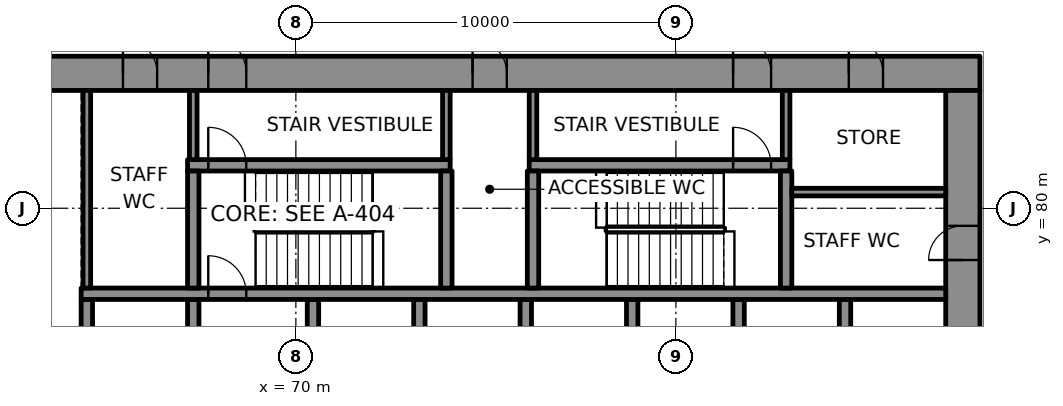
"""IFC4 building model, lengths in metres.
Left out: names, types, materials, properties, quantities, classifications, styles, units other than length and angle.
Written with IfcOpenShell. Run it as: python <this file> out.ifc"""

import sys

from ifc_helpers import new_model, si_unit, direction, frame, frame_2d, origin, place, context, subcontext, project, spatial, rectangle, extrude, element, fill, save


model = new_model("IFC4")
c1 = context("Model", 3, precision=1e-05, world=origin(), true_north=direction((0.0, 1.0)))
c2 = subcontext(c1, "Body", "Model", "MODEL_VIEW")
j1 = project(units=[si_unit("LENGTHUNIT", "METRE"), si_unit("PLANEANGLEUNIT", "RADIAN")], contexts=[c1])
p1 = place(None, origin())
s1 = spatial("IfcSite", under=j1, at=p1, CompositionType="ELEMENT")
p2 = place(p1, origin())
s2 = spatial("IfcBuilding", under=s1, at=p2, CompositionType="ELEMENT")
p3 = place(p2, frame((0.0, 0.0, 52.6)))
s3 = spatial("IfcBuildingStorey", under=s2, at=p3, CompositionType="ELEMENT", Elevation=52.6)
p4 = place(p3, frame((62.9, 83.55, 0.0), z_axis=(0.0, 0.0, 1.0), x_axis=(1.0, 0.0, 0.0)))
e1 = element("IfcWall", 1, at=p4, inside=s3, PredefinedType="SHEAR", context=c2, shape_type="SweptSolid", body=[
    extrude(rectangle(XDim=25.1, YDim=0.9, at=frame_2d((12.55, 0.0))), origin(), (0.0, 0.0, 1.0), 4.0),
])
p5 = place(p4, frame((4.795, 0.0, 0.0)))
e2 = element("IfcOpeningElement", 2, at=p5, cuts=e1, PredefinedType="OPENING", context=c2, shape_type="SweptSolid", body=[
    extrude(rectangle(XDim=1.0, YDim=2.1, at=frame_2d((0.5, 1.05))), frame((0.0, 0.46, 0.0), z_axis=(0.0, -1.0, 0.0), x_axis=(1.0, 0.0, 0.0)), (0.0, 0.0, 1.0), 0.92),
])
p6 = place(p4, frame((18.605, 0.0, 0.0)))
e3 = element("IfcOpeningElement", 3, at=p6, cuts=e1, PredefinedType="OPENING", context=c2, shape_type="SweptSolid", body=[
    extrude(rectangle(XDim=1.0, YDim=2.1, at=frame_2d((0.5, 1.05))), frame((0.0, 0.46, 0.0), z_axis=(0.0, -1.0, 0.0), x_axis=(1.0, 0.0, 0.0)), (0.0, 0.0, 1.0), 0.92),
])
p7 = place(p4, frame((2.55, 0.0, 0.0)))
e4 = element("IfcOpeningElement", 4, at=p7, cuts=e1, PredefinedType="OPENING", context=c2, shape_type="SweptSolid", body=[
    extrude(rectangle(XDim=0.9, YDim=2.1, at=frame_2d((0.45, 1.05))), frame((0.0, 0.46, 0.0), z_axis=(0.0, -1.0, 0.0), x_axis=(1.0, 0.0, 0.0)), (0.0, 0.0, 1.0), 0.92),
])
p8 = place(p4, frame((11.75, 0.0, 0.0)))
e5 = element("IfcOpeningElement", 5, at=p8, cuts=e1, PredefinedType="OPENING", context=c2, shape_type="SweptSolid", body=[
    extrude(rectangle(XDim=0.9, YDim=2.1, at=frame_2d((0.45, 1.05))), frame((0.0, 0.46, 0.0), z_axis=(0.0, -1.0, 0.0), x_axis=(1.0, 0.0, 0.0)), (0.0, 0.0, 1.0), 0.92),
])
p9 = place(p4, frame((21.65, 0.0, 0.0)))
e6 = element("IfcOpeningElement", 6, at=p9, cuts=e1, PredefinedType="OPENING", context=c2, shape_type="SweptSolid", body=[
    extrude(rectangle(XDim=0.9, YDim=2.1, at=frame_2d((0.45, 1.05))), frame((0.0, 0.46, 0.0), z_axis=(0.0, -1.0, 0.0), x_axis=(1.0, 0.0, 0.0)), (0.0, 0.0, 1.0), 0.92),
])
p10 = place(p3, frame((87.55, 66.9, 0.0), z_axis=(0.0, 0.0, 1.0), x_axis=(0.0, 1.0, 0.0)))
e7 = element("IfcWall", 7, at=p10, inside=s3, PredefinedType="SHEAR", context=c2, shape_type="SweptSolid", body=[
    extrude(rectangle(XDim=16.2, YDim=0.9, at=frame_2d((8.1, 0.0))), origin(), (0.0, 0.0, 1.0), 4.0),
])
p11 = place(p10, frame((5.5, 0.0, 0.0)))
e8 = element("IfcOpeningElement", 8, at=p11, cuts=e7, PredefinedType="OPENING", context=c2, shape_type="SweptSolid", body=[
    extrude(rectangle(XDim=1.8, YDim=2.1, at=frame_2d((0.9, 1.05))), frame((0.0, 0.46, 0.0), z_axis=(0.0, -1.0, 0.0), x_axis=(1.0, 0.0, 0.0)), (0.0, 0.0, 1.0), 0.92),
])
p12 = place(p10, frame((11.738, 0.0, 0.0)))
e9 = element("IfcOpeningElement", 9, at=p12, cuts=e7, PredefinedType="OPENING", context=c2, shape_type="SweptSolid", body=[
    extrude(rectangle(XDim=0.9, YDim=2.1, at=frame_2d((0.45, 1.05))), frame((0.0, 0.46, 0.0), z_axis=(0.0, -1.0, 0.0), x_axis=(1.0, 0.0, 0.0)), (0.0, 0.0, 1.0), 0.92),
])
for number, where, z_axis, x_axis in (
    (10, (64.5, 75.0, 0.0), (0.0, 0.0, 1.0), (0.0, 1.0, 0.0)),
    (11, (67.3, 75.0, 0.0), (0.0, 0.0, 1.0), (0.0, 1.0, 0.0)),
):
    element("IfcWall", number, at=place(p3, frame(where, z_axis=z_axis, x_axis=x_axis)), inside=s3, PredefinedType="SHEAR", context=c2, shape_type="SweptSolid", body=[
        extrude(rectangle(XDim=2.6, YDim=0.3, at=frame_2d((1.3, 0.0))), origin(), (0.0, 0.0, 1.0), 4.0),
    ])
p13 = place(p3, frame((70.45, 75.0, 0.0), z_axis=(0.0, 0.0, 1.0), x_axis=(0.0, 1.0, 0.0)))
e12 = element("IfcWall", 12, at=p13, inside=s3, PredefinedType="SHEAR", context=c2, shape_type="SweptSolid", body=[
    extrude(rectangle(XDim=2.6, YDim=0.3, at=frame_2d((1.3, 0.0))), origin(), (0.0, 0.0, 1.0), 4.0),
])
p14 = place(p13, frame((0.15, 0.0, 0.0)))
e13 = element("IfcOpeningElement", 13, at=p14, cuts=e12, PredefinedType="OPENING", context=c2, shape_type="SweptSolid", body=[
    extrude(rectangle(XDim=1.1, YDim=2.1, at=frame_2d((0.55, 1.05))), frame((0.0, 0.16, 0.0), z_axis=(0.0, -1.0, 0.0), x_axis=(1.0, 0.0, 0.0)), (0.0, 0.0, 1.0), 0.32),
])
for number, where, z_axis, x_axis in (
    (14, (73.25, 75.0, 0.0), (0.0, 0.0, 1.0), (0.0, 1.0, 0.0)),
    (15, (76.05, 75.0, 0.0), (0.0, 0.0, 1.0), (0.0, 1.0, 0.0)),
    (16, (78.85, 75.0, 0.0), (0.0, 0.0, 1.0), (0.0, 1.0, 0.0)),
    (17, (81.65, 75.0, 0.0), (0.0, 0.0, 1.0), (0.0, 1.0, 0.0)),
    (18, (84.45, 75.0, 0.0), (0.0, 0.0, 1.0), (0.0, 1.0, 0.0)),
):
    element("IfcWall", number, at=place(p3, frame(where, z_axis=z_axis, x_axis=x_axis)), inside=s3, PredefinedType="SHEAR", context=c2, shape_type="SweptSolid", body=[
        extrude(rectangle(XDim=2.6, YDim=0.3, at=frame_2d((1.3, 0.0))), origin(), (0.0, 0.0, 1.0), 4.0),
    ])
p15 = place(p3, frame((64.35, 77.75, 0.0), z_axis=(0.0, 0.0, 1.0), x_axis=(1.0, 0.0, 0.0)))
e19 = element("IfcWall", 19, at=p15, inside=s3, PredefinedType="SHEAR", context=c2, shape_type="SweptSolid", body=[
    extrude(rectangle(XDim=22.75, YDim=0.3, at=frame_2d((11.375, 0.0))), origin(), (0.0, 0.0, 1.0), 4.0),
])
p16 = place(p15, frame((3.345, 0.0, 0.0)))
e20 = element("IfcOpeningElement", 20, at=p16, cuts=e19, PredefinedType="OPENING", context=c2, shape_type="SweptSolid", body=[
    extrude(rectangle(XDim=1.0, YDim=2.1, at=frame_2d((0.5, 1.05))), frame((0.0, 0.16, 0.0), z_axis=(0.0, -1.0, 0.0), x_axis=(1.0, 0.0, 0.0)), (0.0, 0.0, 1.0), 0.32),
])
p17 = place(p3, frame((67.15, 81.13, 0.0), z_axis=(0.0, 0.0, 1.0), x_axis=(1.0, 0.0, 0.0)))
e21 = element("IfcWall", 21, at=p17, inside=s3, PredefinedType="SHEAR", context=c2, shape_type="SweptSolid", body=[
    extrude(rectangle(XDim=6.91, YDim=0.3, at=frame_2d((3.455, 0.0))), origin(), (0.0, 0.0, 1.0), 4.0),
])
p18 = place(p17, frame((0.545, 0.0, 0.0)))
e22 = element("IfcOpeningElement", 22, at=p18, cuts=e21, PredefinedType="OPENING", context=c2, shape_type="SweptSolid", body=[
    extrude(rectangle(XDim=1.0, YDim=2.1, at=frame_2d((0.5, 1.05))), frame((0.0, 0.16, 0.0), z_axis=(0.0, -1.0, 0.0), x_axis=(1.0, 0.0, 0.0)), (0.0, 0.0, 1.0), 0.32),
])
p19 = place(p3, frame((76.14, 81.13, 0.0), z_axis=(0.0, 0.0, 1.0), x_axis=(1.0, 0.0, 0.0)))
e23 = element("IfcWall", 23, at=p19, inside=s3, PredefinedType="SHEAR", context=c2, shape_type="SweptSolid", body=[
    extrude(rectangle(XDim=6.86, YDim=0.3, at=frame_2d((3.43, 0.0))), origin(), (0.0, 0.0, 1.0), 4.0),
])
p20 = place(p19, frame((5.365, 0.0, 0.0)))
e24 = element("IfcOpeningElement", 24, at=p20, cuts=e23, PredefinedType="OPENING", context=c2, shape_type="SweptSolid", body=[
    extrude(rectangle(XDim=1.0, YDim=2.1, at=frame_2d((0.5, 1.05))), frame((0.0, 0.16, 0.0), z_axis=(0.0, -1.0, 0.0), x_axis=(1.0, 0.0, 0.0)), (0.0, 0.0, 1.0), 0.32),
])
for number, where, z_axis, x_axis in (
    (25, (67.3, 77.9, 0.0), (0.0, 0.0, 1.0), (0.0, 1.0, 0.0)),
    (26, (73.96, 77.9, 0.0), (0.0, 0.0, 1.0), (0.0, 1.0, 0.0)),
    (27, (76.24, 77.9, 0.0), (0.0, 0.0, 1.0), (0.0, 1.0, 0.0)),
    (28, (82.9, 77.9, 0.0), (0.0, 0.0, 1.0), (0.0, 1.0, 0.0)),
):
    element("IfcWall", number, at=place(p3, frame(where, z_axis=z_axis, x_axis=x_axis)), inside=s3, PredefinedType="SHEAR", context=c2, shape_type="SweptSolid", body=[
        extrude(rectangle(XDim=3.08, YDim=0.3, at=frame_2d((1.54, 0.0))), origin(), (0.0, 0.0, 1.0), 4.0),
    ])
p21 = place(p3, frame((110.994, 61.012, 0.0), z_axis=(0.0, 0.0, 1.0), x_axis=(-0.500000853759, 0.866024910866, 0.0)))
e29 = element("IfcWall", 29, at=p21, inside=s3, PredefinedType="SOLIDWALL", context=c2, shape_type="SweptSolid", body=[
    extrude(rectangle(XDim=60.222, YDim=0.8, at=frame_2d((30.111, 0.0))), origin(), (0.0, 0.0, 1.0), 0.9),
])
p22 = place(p3, frame((83.05, 80.425, 0.0), z_axis=(0.0, 0.0, 1.0), x_axis=(1.0, 0.0, 0.0)))
e30 = element("IfcWall", 30, at=p22, inside=s3, PredefinedType="PARTITIONING", context=c2, shape_type="SweptSolid", body=[
    extrude(rectangle(XDim=4.05, YDim=0.2, at=frame_2d((2.025, 0.0))), origin(), (0.0, 0.0, 1.0), 4.0),
])
p23 = place(p3, frame((64.5, 77.9, 0.0), z_axis=(0.0, 0.0, 1.0), x_axis=(0.0, 1.0, 0.0)))
e31 = element("IfcWall", 31, at=p23, inside=s3, PredefinedType="PARTITIONING", context=c2, shape_type="SweptSolid", body=[
    extrude(rectangle(XDim=5.2, YDim=0.2, at=frame_2d((2.6, 0.0))), origin(), (0.0, 0.0, 1.0), 4.0),
])
for number, where, z_axis, x_axis in (
    (32, (67.3, 81.28, 0.0), (0.0, 0.0, 1.0), (0.0, 1.0, 0.0)),
    (33, (73.96, 81.28, 0.0), (0.0, 0.0, 1.0), (0.0, 1.0, 0.0)),
    (34, (76.24, 81.28, 0.0), (0.0, 0.0, 1.0), (0.0, 1.0, 0.0)),
    (35, (82.9, 81.28, 0.0), (0.0, 0.0, 1.0), (0.0, 1.0, 0.0)),
):
    element("IfcWall", number, at=place(p3, frame(where, z_axis=z_axis, x_axis=x_axis)), inside=s3, PredefinedType="PARTITIONING", context=c2, shape_type="SweptSolid", body=[
        extrude(rectangle(XDim=1.82, YDim=0.2, at=frame_2d((0.91, 0.0))), origin(), (0.0, 0.0, 1.0), 4.0),
    ])
p24 = place(p16, origin())
e36 = element("IfcDoor", 36, at=p24, inside=s3, OperationType="SINGLE_SWING_LEFT", PredefinedType="DOOR", context=c2, shape_type="SweptSolid", body=[
    extrude(rectangle(XDim=1.0, YDim=2.1, at=frame_2d((0.5, 1.05))), frame((0.0, 0.025, 0.0), z_axis=(0.0, -1.0, 0.0), x_axis=(1.0, 0.0, 0.0)), (0.0, 0.0, 1.0), 0.05),
])
fill(e20, e36)
p25 = place(p18, origin())
e37 = element("IfcDoor", 37, at=p25, inside=s3, OperationType="SINGLE_SWING_RIGHT", PredefinedType="DOOR", context=c2, shape_type="SweptSolid", body=[
    extrude(rectangle(XDim=1.0, YDim=2.1, at=frame_2d((0.5, 1.05))), frame((0.0, 0.025, 0.0), z_axis=(0.0, -1.0, 0.0), x_axis=(1.0, 0.0, 0.0)), (0.0, 0.0, 1.0), 0.05),
])
fill(e22, e37)
p26 = place(p5, origin())
e38 = element("IfcDoor", 38, at=p26, inside=s3, OperationType="SINGLE_SWING_LEFT", PredefinedType="DOOR", context=c2, shape_type="SweptSolid", body=[
    extrude(rectangle(XDim=1.0, YDim=2.1, at=frame_2d((0.5, 1.05))), frame((0.0, 0.17, 0.0), z_axis=(0.0, -1.0, 0.0), x_axis=(1.0, 0.0, 0.0)), (0.0, 0.0, 1.0), 0.34),
])
fill(e2, e38)
p27 = place(p20, origin())
e39 = element("IfcDoor", 39, at=p27, inside=s3, OperationType="SINGLE_SWING_RIGHT", PredefinedType="DOOR", context=c2, shape_type="SweptSolid", body=[
    extrude(rectangle(XDim=1.0, YDim=2.1, at=frame_2d((0.5, 1.05))), frame((0.0, 0.025, 0.0), z_axis=(0.0, -1.0, 0.0), x_axis=(1.0, 0.0, 0.0)), (0.0, 0.0, 1.0), 0.05),
])
fill(e24, e39)
p28 = place(p6, origin())
e40 = element("IfcDoor", 40, at=p28, inside=s3, OperationType="SINGLE_SWING_LEFT", PredefinedType="DOOR", context=c2, shape_type="SweptSolid", body=[
    extrude(rectangle(XDim=1.0, YDim=2.1, at=frame_2d((0.5, 1.05))), frame((0.0, 0.17, 0.0), z_axis=(0.0, -1.0, 0.0), x_axis=(1.0, 0.0, 0.0)), (0.0, 0.0, 1.0), 0.34),
])
fill(e3, e40)
p29 = place(p7, origin())
e41 = element("IfcDoor", 41, at=p29, inside=s3, OperationType="SINGLE_SWING_RIGHT", PredefinedType="DOOR", context=c2, shape_type="SweptSolid", body=[
    extrude(rectangle(XDim=0.9, YDim=2.1, at=frame_2d((0.45, 1.05))), frame((0.0, 0.17, 0.0), z_axis=(0.0, -1.0, 0.0), x_axis=(1.0, 0.0, 0.0)), (0.0, 0.0, 1.0), 0.34),
])
fill(e4, e41)
p30 = place(p8, origin())
e42 = element("IfcDoor", 42, at=p30, inside=s3, OperationType="SINGLE_SWING_LEFT", PredefinedType="DOOR", context=c2, shape_type="SweptSolid", body=[
    extrude(rectangle(XDim=0.9, YDim=2.1, at=frame_2d((0.45, 1.05))), frame((0.0, 0.17, 0.0), z_axis=(0.0, -1.0, 0.0), x_axis=(1.0, 0.0, 0.0)), (0.0, 0.0, 1.0), 0.34),
])
fill(e5, e42)
p31 = place(p12, origin())
e43 = element("IfcDoor", 43, at=p31, inside=s3, OperationType="SINGLE_SWING_RIGHT", PredefinedType="DOOR", context=c2, shape_type="SweptSolid", body=[
    extrude(rectangle(XDim=0.9, YDim=2.1, at=frame_2d((0.45, 1.05))), frame((0.0, 0.17, 0.0), z_axis=(0.0, -1.0, 0.0), x_axis=(1.0, 0.0, 0.0)), (0.0, 0.0, 1.0), 0.34),
])
fill(e9, e43)
p32 = place(p9, origin())
e44 = element("IfcDoor", 44, at=p32, inside=s3, OperationType="SINGLE_SWING_LEFT", PredefinedType="DOOR", context=c2, shape_type="SweptSolid", body=[
    extrude(rectangle(XDim=0.9, YDim=2.1, at=frame_2d((0.45, 1.05))), frame((0.0, 0.17, 0.0), z_axis=(0.0, -1.0, 0.0), x_axis=(1.0, 0.0, 0.0)), (0.0, 0.0, 1.0), 0.34),
])
fill(e6, e44)
save(model, sys.argv[1])
